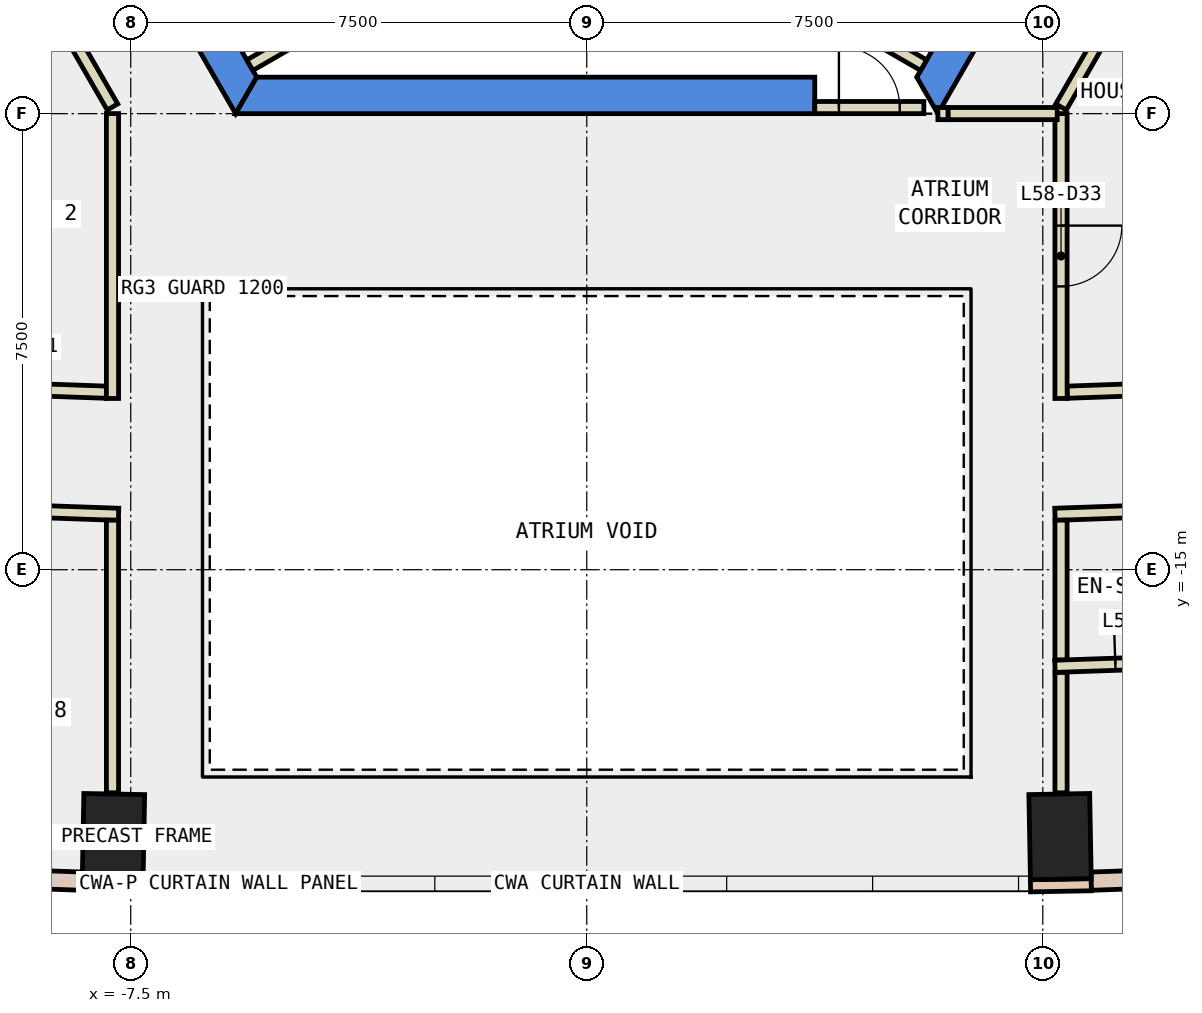
"""IFC4 building model, lengths in metres.
Left out: names, types, materials, properties, quantities, classifications, styles, units other than length and angle.
Written with IfcOpenShell. Run it as: python <this file> out.ifc"""

import sys

from ifc_helpers import new_model, si_unit, direction, frame, frame_2d, origin, origin_2d, place, context, subcontext, project, spatial, polyline, rectangle, outline, extrude, element, fill, save


model = new_model("IFC4")
c1 = context("Model", 3, precision=1e-05, world=origin(), true_north=direction((0.0, 1.0)))
c2 = subcontext(c1, "Body", "Model", "MODEL_VIEW")
j1 = project(units=[si_unit("LENGTHUNIT", "METRE"), si_unit("PLANEANGLEUNIT", "RADIAN")], contexts=[c1])
p1 = place(None, origin())
s1 = spatial("IfcSite", under=j1, at=p1, CompositionType="ELEMENT")
p2 = place(p1, origin())
s2 = spatial("IfcBuilding", under=s1, at=p2, CompositionType="ELEMENT")
p3 = place(p2, frame((0.0, 0.0, 255.8)))
s3 = spatial("IfcBuildingStorey", under=s2, at=p3, CompositionType="ELEMENT", Elevation=255.8)
for number, where, z_axis, x_axis in (
    (1, (-7.784, -19.389, -0.34), (0.0, 0.0, 1.0), (-1.0, 0.018, 0.0)),
    (2, (7.784, -19.389, -0.34), (0.0, 0.0, 1.0), (1.0, 0.018, 0.0)),
):
    element("IfcColumn", number, at=place(p3, frame(where, z_axis=z_axis, x_axis=x_axis)), inside=s3, PredefinedType="COLUMN", context=c2, shape_type="SweptSolid", body=[
        extrude(rectangle(XDim=1.0, YDim=1.4, at=origin_2d()), origin(), (0.0, 0.0, 1.0), 3.6),
    ])
p4 = place(p3, frame((0.0, 0.0, -0.34)))
e3 = element("IfcWall", 3, at=p4, inside=s3, PredefinedType="SHEAR", context=c2, shape_type="SweptSolid", body=[
    extrude(outline(polyline([(-11.547, 2.5), (-5.774, -7.5), (-5.427, -6.9), (-10.854, 2.5), (-11.547, 2.5)])), origin(), (0.0, 0.0, 1.0), 3.6),
])
p5 = place(p3, frame((0.0, 0.0, -0.34)))
e4 = element("IfcWall", 4, at=p5, inside=s3, PredefinedType="SHEAR", context=c2, shape_type="SweptSolid", body=[
    extrude(outline(polyline([(3.75, -7.5), (3.75, -6.9), (-5.427, -6.9), (-5.774, -7.5), (3.75, -7.5)])), origin(), (0.0, 0.0, 1.0), 3.6),
])
p6 = place(p3, frame((0.0, 0.0, -0.34)))
e5 = element("IfcWall", 5, at=p6, inside=s3, PredefinedType="SHEAR", context=c2, shape_type="SweptSolid", body=[
    extrude(outline(polyline([(5.774, -7.5), (11.547, 2.5), (10.854, 2.5), (5.427, -6.9), (5.774, -7.5)])), origin(), (0.0, 0.0, 1.0), 3.6),
])
for number, where, z_axis, x_axis in (
    (6, (7.578, -4.375, -0.34), (0.0, 0.0, 1.0), (0.866, -0.5, 0.0)),
    (7, (-7.578, -4.375, -0.34), (0.0, 0.0, 1.0), (-0.866, -0.5, 0.0)),
):
    element("IfcWall", number, at=place(p3, frame(where, z_axis=z_axis, x_axis=x_axis)), inside=s3, PredefinedType="SHEAR", context=c2, shape_type="SweptSolid", body=[
        extrude(rectangle(XDim=9.0, YDim=0.8, at=frame_2d((4.5, 0.0))), origin(), (0.0, 0.0, 1.0), 3.6),
    ])
for number, where, z_axis, x_axis in (
    (8, (-8.298, -20.18, 0.0), (0.0, 0.0, 1.0), (1.0, -0.018, 0.0)),
    (9, (7.298, -20.198, 0.0), (0.0, 0.0, 1.0), (1.0, 0.018, 0.0)),
):
    element("IfcWall", number, at=place(p3, frame(where, z_axis=z_axis, x_axis=x_axis)), inside=s3, PredefinedType="STANDARD", context=c2, shape_type="SweptSolid", body=[
        extrude(rectangle(XDim=1.0, YDim=0.2, at=frame_2d((0.5, 0.0))), origin(), (0.0, 0.0, 1.0), 3.26),
    ])
p7 = place(p3, frame((-15.952, -19.854, 0.0), z_axis=(0.0, 0.0, 1.0), x_axis=(0.999387577449, -0.034992428331, 0.0)))
e10 = element("IfcWall", 10, at=p7, inside=s3, PredefinedType="STANDARD", context=c2, shape_type="SweptSolid", body=[
    extrude(rectangle(XDim=7.661, YDim=0.3, at=frame_2d((3.83, 0.0))), origin(), (0.0, 0.0, 1.0), 3.26),
])
p8 = place(p7, frame((0.815, 0.0, 0.9)))
e11 = element("IfcOpeningElement", 11, at=p8, cuts=e10, PredefinedType="OPENING", context=c2, shape_type="SweptSolid", body=[
    extrude(rectangle(XDim=2.2, YDim=2.0, at=frame_2d((1.1, 1.0))), frame((0.0, 0.16, 0.0), z_axis=(0.0, -1.0, 0.0), x_axis=(1.0, 0.0, 0.0)), (0.0, 0.0, 1.0), 0.32),
])
p9 = place(p7, frame((4.646, 0.0, 0.9)))
e12 = element("IfcOpeningElement", 12, at=p9, cuts=e10, PredefinedType="OPENING", context=c2, shape_type="SweptSolid", body=[
    extrude(rectangle(XDim=2.2, YDim=2.0, at=frame_2d((1.1, 1.0))), frame((0.0, 0.16, 0.0), z_axis=(0.0, -1.0, 0.0), x_axis=(1.0, 0.0, 0.0)), (0.0, 0.0, 1.0), 0.32),
])
p10 = place(p3, frame((8.296, -20.122, 0.0), z_axis=(0.0, 0.0, 1.0), x_axis=(0.999387577449, 0.034992428331, 0.0)))
e13 = element("IfcWall", 13, at=p10, inside=s3, PredefinedType="STANDARD", context=c2, shape_type="SweptSolid", body=[
    extrude(rectangle(XDim=7.661, YDim=0.3, at=frame_2d((3.83, 0.0))), origin(), (0.0, 0.0, 1.0), 3.26),
])
p11 = place(p10, frame((0.815, 0.0, 0.9)))
e14 = element("IfcOpeningElement", 14, at=p11, cuts=e13, PredefinedType="OPENING", context=c2, shape_type="SweptSolid", body=[
    extrude(rectangle(XDim=2.2, YDim=2.0, at=frame_2d((1.1, 1.0))), frame((0.0, 0.16, 0.0), z_axis=(0.0, -1.0, 0.0), x_axis=(1.0, 0.0, 0.0)), (0.0, 0.0, 1.0), 0.32),
])
p12 = place(p10, frame((4.646, 0.0, 0.9)))
e15 = element("IfcOpeningElement", 15, at=p12, cuts=e13, PredefinedType="OPENING", context=c2, shape_type="SweptSolid", body=[
    extrude(rectangle(XDim=2.2, YDim=2.0, at=frame_2d((1.1, 1.0))), frame((0.0, 0.16, 0.0), z_axis=(0.0, -1.0, 0.0), x_axis=(1.0, 0.0, 0.0)), (0.0, 0.0, 1.0), 0.32),
])
p13 = place(p3, frame((7.9, -12.081, 0.0), z_axis=(0.0, 0.0, 1.0), x_axis=(0.999365240621, 0.035624652105, 0.0)))
e16 = element("IfcWall", 16, at=p13, inside=s3, PredefinedType="PARTITIONING", context=c2, shape_type="SweptSolid", body=[
    extrude(rectangle(XDim=1.042, YDim=0.2, at=frame_2d((0.521, 0.0))), origin(), (0.0, 0.0, 1.0), 3.26),
])
p14 = place(p3, frame((-7.8, -7.39, 0.0), z_axis=(0.0, 0.0, 1.0), x_axis=(-0.500266477503, 0.865871498253, 0.0)))
e17 = element("IfcWall", 17, at=p14, inside=s3, PredefinedType="PARTITIONING", context=c2, shape_type="SweptSolid", body=[
    extrude(rectangle(XDim=1.463, YDim=0.2, at=frame_2d((0.731, 0.0))), origin(), (0.0, 0.0, 1.0), 3.26),
])
p15 = place(p3, frame((-10.826, -11.978, 0.0), z_axis=(0.0, 0.0, 1.0), x_axis=(0.999380679818, -0.035188873332, 0.0)))
e18 = element("IfcWall", 18, at=p15, inside=s3, PredefinedType="PARTITIONING", context=c2, shape_type="SweptSolid", body=[
    extrude(rectangle(XDim=2.928, YDim=0.2, at=frame_2d((1.464, 0.0))), origin(), (0.0, 0.0, 1.0), 3.26),
])
p16 = place(p15, frame((0.964, 0.0, 0.0)))
e19 = element("IfcOpeningElement", 19, at=p16, cuts=e18, PredefinedType="OPENING", context=c2, shape_type="SweptSolid", body=[
    extrude(rectangle(XDim=1.0, YDim=2.1, at=frame_2d((0.5, 1.05))), frame((0.0, 0.11, 0.0), z_axis=(0.0, -1.0, 0.0), x_axis=(1.0, 0.0, 0.0)), (0.0, 0.0, 1.0), 0.22),
])
p17 = place(p3, frame((10.298, -13.998, 0.0), z_axis=(0.0, 0.0, 1.0), x_axis=(-0.999386321032, -0.035028293342, 0.0)))
e20 = element("IfcWall", 20, at=p17, inside=s3, PredefinedType="PARTITIONING", context=c2, shape_type="SweptSolid", body=[
    extrude(rectangle(XDim=2.6, YDim=0.2, at=frame_2d((1.3, 0.0))), origin(), (0.0, 0.0, 1.0), 3.26),
])
p18 = place(p3, frame((-7.7, -14.089, 0.0), z_axis=(0.0, 0.0, 1.0), x_axis=(-0.999388410674, 0.034968623214, 0.0)))
e21 = element("IfcWall", 21, at=p18, inside=s3, PredefinedType="PARTITIONING", context=c2, shape_type="SweptSolid", body=[
    extrude(rectangle(XDim=5.264, YDim=0.2, at=frame_2d((2.632, 0.0))), origin(), (0.0, 0.0, 1.0), 3.26),
])
p19 = place(p18, frame((2.182, 0.0, 0.0)))
e22 = element("IfcOpeningElement", 22, at=p19, cuts=e21, PredefinedType="OPENING", context=c2, shape_type="SweptSolid", body=[
    extrude(rectangle(XDim=1.0, YDim=2.1, at=frame_2d((0.5, 1.05))), frame((0.0, 0.11, 0.0), z_axis=(0.0, -1.0, 0.0), x_axis=(1.0, 0.0, 0.0)), (0.0, 0.0, 1.0), 0.22),
])
for number, where, z_axis, x_axis in (
    (23, (5.541, -6.703, 0.0), (0.0, 0.0, 1.0), (-0.866, 0.5, 0.0)),
    (24, (-4.588, -6.153, 0.0), (0.0, 0.0, 1.0), (-0.866, -0.5, 0.0)),
):
    element("IfcWall", number, at=place(p3, frame(where, z_axis=z_axis, x_axis=x_axis)), inside=s3, PredefinedType="PARTITIONING", context=c2, shape_type="SweptSolid", body=[
        extrude(rectangle(XDim=1.1, YDim=0.2, at=frame_2d((0.55, 0.0))), origin(), (0.0, 0.0, 1.0), 3.26),
    ])
p20 = place(p3, frame((5.775, -7.499, 0.0), z_axis=(0.0, 0.0, 1.0), x_axis=(1.0, 0.0, 0.0)))
e25 = element("IfcWall", 25, at=p20, inside=s3, PredefinedType="PARTITIONING", context=c2, shape_type="SweptSolid", body=[
    extrude(rectangle(XDim=0.169, YDim=0.2, at=frame_2d((0.084, 0.0))), origin(), (0.0, 0.0, 1.0), 2.4),
])
p21 = place(p3, frame((7.8, -7.39, 0.0), z_axis=(0.0, 0.0, 1.0), x_axis=(0.499977374825, 0.866038466041, 0.0)))
e26 = element("IfcWall", 26, at=p21, inside=s3, PredefinedType="PARTITIONING", context=c2, shape_type="SweptSolid", body=[
    extrude(rectangle(XDim=2.1, YDim=0.2, at=frame_2d((1.05, 0.0))), origin(), (0.0, 0.0, 1.0), 3.26),
])
p22 = place(p3, frame((7.8, -7.499, 0.0), z_axis=(0.0, 0.0, 1.0), x_axis=(0.0, -1.0, 0.0)))
e27 = element("IfcWall", 27, at=p22, inside=s3, PredefinedType="PARTITIONING", context=c2, shape_type="SweptSolid", body=[
    extrude(rectangle(XDim=4.685, YDim=0.2, at=frame_2d((2.343, 0.0))), origin(), (0.0, 0.0, 1.0), 3.26),
])
p23 = place(p22, frame((1.842, 0.0, 0.0)))
e28 = element("IfcOpeningElement", 28, at=p23, cuts=e27, PredefinedType="OPENING", context=c2, shape_type="SweptSolid", body=[
    extrude(rectangle(XDim=1.0, YDim=2.1, at=frame_2d((0.5, 1.05))), frame((0.0, 0.11, 0.0), z_axis=(0.0, -1.0, 0.0), x_axis=(1.0, 0.0, 0.0)), (0.0, 0.0, 1.0), 0.22),
])
p24 = place(p3, frame((-7.8, -12.184, 0.0), z_axis=(0.0, 0.0, 1.0), x_axis=(0.0, 1.0, 0.0)))
e29 = element("IfcWall", 29, at=p24, inside=s3, PredefinedType="PARTITIONING", context=c2, shape_type="SweptSolid", body=[
    extrude(rectangle(XDim=4.685, YDim=0.2, at=frame_2d((2.343, 0.0))), origin(), (0.0, 0.0, 1.0), 3.26),
])
p25 = place(p3, frame((7.8, -16.686, 0.0), z_axis=(0.0, 0.0, 1.0), x_axis=(0.0, -1.0, 0.0)))
e30 = element("IfcWall", 30, at=p25, inside=s3, PredefinedType="PARTITIONING", context=c2, shape_type="SweptSolid", body=[
    extrude(rectangle(XDim=1.983, YDim=0.2, at=frame_2d((0.991, 0.0))), origin(), (0.0, 0.0, 1.0), 3.26),
])
p26 = place(p3, frame((7.8, -14.185, 0.0), z_axis=(0.0, 0.0, 1.0), x_axis=(0.0, -1.0, 0.0)))
e31 = element("IfcWall", 31, at=p26, inside=s3, PredefinedType="PARTITIONING", context=c2, shape_type="SweptSolid", body=[
    extrude(rectangle(XDim=2.301, YDim=0.2, at=frame_2d((1.15, 0.0))), origin(), (0.0, 0.0, 1.0), 3.26),
])
p27 = place(p3, frame((-7.8, -18.669, 0.0), z_axis=(0.0, 0.0, 1.0), x_axis=(0.0, 1.0, 0.0)))
e32 = element("IfcWall", 32, at=p27, inside=s3, PredefinedType="PARTITIONING", context=c2, shape_type="SweptSolid", body=[
    extrude(rectangle(XDim=4.484, YDim=0.2, at=frame_2d((2.242, 0.0))), origin(), (0.0, 0.0, 1.0), 3.26),
])
p28 = place(p3, frame((-8.582, -6.036, 0.0), z_axis=(0.0, 0.0, 1.0), x_axis=(-0.897105141673, -0.441817116897, 0.0)))
e33 = element("IfcWall", 33, at=p28, inside=s3, PredefinedType="PARTITIONING", context=c2, shape_type="SweptSolid", body=[
    extrude(rectangle(XDim=5.111, YDim=0.2, at=frame_2d((2.555, 0.0))), origin(), (0.0, 0.0, 1.0), 3.26),
])
p29 = place(p3, frame((7.7, -16.589, 0.0), z_axis=(0.0, 0.0, 1.0), x_axis=(0.999410709261, 0.034325416459, 0.0)))
e34 = element("IfcWall", 34, at=p29, inside=s3, PredefinedType="PARTITIONING", context=c2, shape_type="SweptSolid", body=[
    extrude(rectangle(XDim=2.888, YDim=0.2, at=frame_2d((1.444, 0.0))), origin(), (0.0, 0.0, 1.0), 3.26),
])
p30 = place(p29, frame((0.994, 0.0, 0.0)))
e35 = element("IfcOpeningElement", 35, at=p30, cuts=e34, PredefinedType="OPENING", context=c2, shape_type="SweptSolid", body=[
    extrude(rectangle(XDim=0.9, YDim=2.1, at=frame_2d((0.45, 1.05))), frame((0.0, 0.11, 0.0), z_axis=(0.0, -1.0, 0.0), x_axis=(1.0, 0.0, 0.0)), (0.0, 0.0, 1.0), 0.22),
])
p31 = place(p3, frame((3.75, -7.4, 0.0), z_axis=(0.0, 0.0, 1.0), x_axis=(1.0, 0.0, 0.0)))
e36 = element("IfcWall", 36, at=p31, inside=s3, PredefinedType="PARTITIONING", context=c2, shape_type="SweptSolid", body=[
    extrude(rectangle(XDim=1.794, YDim=0.2, at=frame_2d((0.897, 0.0))), origin(), (0.0, 0.0, 1.0), 2.4),
])
p32 = place(p31, frame((0.397, 0.0, 0.0)))
e37 = element("IfcOpeningElement", 37, at=p32, cuts=e36, PredefinedType="OPENING", context=c2, shape_type="SweptSolid", body=[
    extrude(rectangle(XDim=1.0, YDim=2.1, at=frame_2d((0.5, 1.05))), frame((0.0, 0.11, 0.0), z_axis=(0.0, -1.0, 0.0), x_axis=(1.0, 0.0, 0.0)), (0.0, 0.0, 1.0), 0.22),
])
p33 = place(p3, frame((5.944, -7.499, 0.0), z_axis=(0.0, 0.0, 1.0), x_axis=(1.0, 0.0, 0.0)))
e38 = element("IfcWall", 38, at=p33, inside=s3, PredefinedType="PARTITIONING", context=c2, shape_type="SweptSolid", body=[
    extrude(rectangle(XDim=1.793, YDim=0.2, at=frame_2d((0.896, 0.0))), origin(), (0.0, 0.0, 1.0), 3.26),
])
p34 = place(p30, origin())
e39 = element("IfcDoor", 39, at=p34, inside=s3, OperationType="SINGLE_SWING_LEFT", PredefinedType="DOOR", context=c2, shape_type="SweptSolid", body=[
    extrude(rectangle(XDim=0.9, YDim=2.1, at=frame_2d((0.45, 1.05))), frame((0.0, 0.025, 0.0), z_axis=(0.0, -1.0, 0.0), x_axis=(1.0, 0.0, 0.0)), (0.0, 0.0, 1.0), 0.05),
])
fill(e35, e39)
p35 = place(p23, origin())
e40 = element("IfcDoor", 40, at=p35, inside=s3, OperationType="SINGLE_SWING_LEFT", PredefinedType="DOOR", context=c2, shape_type="SweptSolid", body=[
    extrude(rectangle(XDim=1.0, YDim=2.1, at=frame_2d((0.5, 1.05))), frame((0.0, 0.025, 0.0), z_axis=(0.0, -1.0, 0.0), x_axis=(1.0, 0.0, 0.0)), (0.0, 0.0, 1.0), 0.05),
])
fill(e28, e40)
p36 = place(p32, origin())
e41 = element("IfcDoor", 41, at=p36, inside=s3, OperationType="SINGLE_SWING_LEFT", PredefinedType="DOOR", context=c2, shape_type="SweptSolid", body=[
    extrude(rectangle(XDim=1.0, YDim=2.1, at=frame_2d((0.5, 1.05))), frame((0.0, 0.025, 0.0), z_axis=(0.0, -1.0, 0.0), x_axis=(1.0, 0.0, 0.0)), (0.0, 0.0, 1.0), 0.05),
])
fill(e37, e41)
save(model, sys.argv[1])
